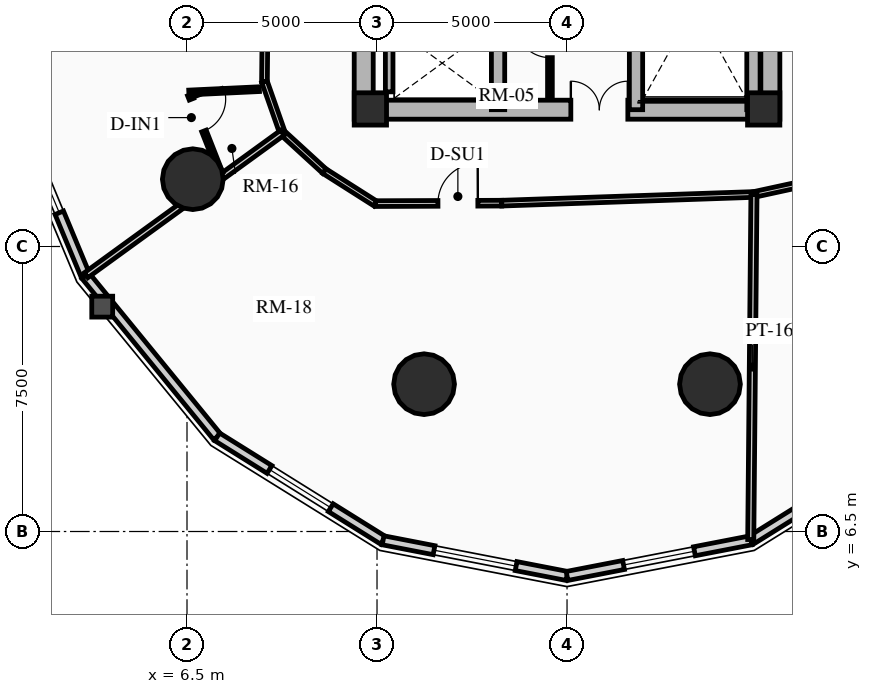
"""IFC4 building model, lengths in metres.
Left out: names, types, materials, properties, quantities, classifications, styles, units other than length and angle.
Written with IfcOpenShell. Run it as: python <this file> out.ifc"""

import sys

from ifc_helpers import new_model, si_unit, direction, frame, frame_2d, origin, origin_2d, place, context, subcontext, project, spatial, rectangle, circle, extrude, source, transform, mapped, element, fill, save


model = new_model("IFC4")
c1 = context("Model", 3, precision=1e-05, world=origin(), true_north=direction((0.0, 1.0)))
c2 = subcontext(c1, "Body", "Model", "MODEL_VIEW")
j1 = project(units=[si_unit("LENGTHUNIT", "METRE"), si_unit("PLANEANGLEUNIT", "RADIAN")], contexts=[c1])
p1 = place(None, origin())
s1 = spatial("IfcSite", under=j1, at=p1, CompositionType="ELEMENT")
p2 = place(p1, origin())
s2 = spatial("IfcBuilding", under=s1, at=p2, CompositionType="ELEMENT")
p3 = place(p2, frame((0.0, 0.0, 62.74)))
s3 = spatial("IfcBuildingStorey", under=s2, at=p3, CompositionType="ELEMENT", Elevation=62.74)
for number, where, z_axis, x_axis in (
    (1, (11.15, 17.35, 0.0), (0.0, 0.0, 1.0), (0.0, 1.0, 0.0)),
    (2, (21.85, 17.35, 0.0), (0.0, 0.0, 1.0), (0.0, 1.0, 0.0)),
):
    element("IfcWall", number, at=place(p3, frame(where, z_axis=z_axis, x_axis=x_axis)), inside=s3, PredefinedType="SHEAR", context=c2, shape_type="SweptSolid", body=[
        extrude(rectangle(XDim=14.3, YDim=0.5, at=frame_2d((7.15, 0.0))), origin(), (0.0, 0.0, 1.0), 2.91),
    ])
p4 = place(p3, frame((11.15, 17.6, 0.0), z_axis=(0.0, 0.0, 1.0), x_axis=(1.0, 0.0, 0.0)))
e3 = element("IfcWall", 3, at=p4, inside=s3, PredefinedType="SHEAR", context=c2, shape_type="SweptSolid", body=[
    extrude(rectangle(XDim=10.7, YDim=0.5, at=frame_2d((5.35, 0.0))), origin(), (0.0, 0.0, 1.0), 2.91),
])
m1 = source(origin(), c2, "Body", "SweptSolid", [
    extrude(rectangle(XDim=1.5, YDim=2.02, at=frame_2d((0.75, 1.01))), frame((0.0, 0.26, 0.0), z_axis=(0.0, -1.0, 0.0), x_axis=(1.0, 0.0, 0.0)), (0.0, 0.0, 1.0), 0.52),
])
p5 = place(p4, frame((5.45, 0.0, 0.0)))
e4 = element("IfcOpeningElement", 4, at=p5, cuts=e3, PredefinedType="OPENING", context=c2, shape_type="MappedRepresentation", body=[
    mapped(m1, transform((0.0, 0.0, 0.0), x_axis=(1.0, 0.0, 0.0), y_axis=(0.0, 1.0, 0.0), z_axis=(0.0, 0.0, 1.0), scale=1.0)),
])
p6 = place(p3, frame((14.685, 17.6, 0.0), z_axis=(0.0, 0.0, 1.0), x_axis=(0.0, 1.0, 0.0)))
e5 = element("IfcWall", 5, at=p6, inside=s3, PredefinedType="SHEAR", context=c2, shape_type="SweptSolid", body=[
    extrude(rectangle(XDim=13.8, YDim=0.35, at=frame_2d((6.9, 0.0))), origin(), (0.0, 0.0, 1.0), 2.91),
])
m2 = source(origin(), c2, "Body", "SweptSolid", [
    extrude(rectangle(XDim=1.1, YDim=2.015, at=frame_2d((0.55, 1.007))), frame((0.0, 0.185, 0.0), z_axis=(0.0, -1.0, 0.0), x_axis=(1.0, 0.0, 0.0)), (0.0, 0.0, 1.0), 0.37),
])
p7 = place(p6, frame((4.9, 0.0, 0.0)))
e6 = element("IfcOpeningElement", 6, at=p7, cuts=e5, PredefinedType="OPENING", context=c2, shape_type="MappedRepresentation", body=[
    mapped(m2, transform((0.0, 0.0, 0.0), x_axis=(1.0, 0.0, 0.0), y_axis=(0.0, 1.0, 0.0), z_axis=(0.0, 0.0, 1.0), scale=1.0)),
])
m3 = source(origin(), c2, "Body", "SweptSolid", [
    extrude(rectangle(XDim=1.15, YDim=2.02, at=frame_2d((0.575, 1.01))), frame((0.0, 0.185, 0.0), z_axis=(0.0, -1.0, 0.0), x_axis=(1.0, 0.0, 0.0)), (0.0, 0.0, 1.0), 0.37),
])
p8 = place(p6, frame((7.32, 0.0, 0.0)))
e7 = element("IfcOpeningElement", 7, at=p8, cuts=e5, PredefinedType="OPENING", context=c2, shape_type="MappedRepresentation", body=[
    mapped(m3, transform((0.0, 0.0, 0.0), x_axis=(1.0, 0.0, 0.0), y_axis=(0.0, 1.0, 0.0), z_axis=(0.0, 0.0, 1.0), scale=1.0)),
])
p9 = place(p3, frame((18.315, 17.6, 0.0), z_axis=(0.0, 0.0, 1.0), x_axis=(0.0, 1.0, 0.0)))
e8 = element("IfcWall", 8, at=p9, inside=s3, PredefinedType="SHEAR", context=c2, shape_type="SweptSolid", body=[
    extrude(rectangle(XDim=13.8, YDim=0.35, at=frame_2d((6.9, 0.0))), origin(), (0.0, 0.0, 1.0), 2.91),
])
p10 = place(p9, frame((10.025, 0.0, 0.0)))
e9 = element("IfcOpeningElement", 9, at=p10, cuts=e8, PredefinedType="OPENING", context=c2, shape_type="MappedRepresentation", body=[
    mapped(m2, transform((0.0, 0.0, 0.0), x_axis=(1.0, 0.0, 0.0), y_axis=(0.0, 1.0, 0.0), z_axis=(0.0, 0.0, 1.0), scale=1.0)),
])
p11 = place(p9, frame((12.025, 0.0, 0.0)))
e10 = element("IfcOpeningElement", 10, at=p11, cuts=e8, PredefinedType="OPENING", context=c2, shape_type="MappedRepresentation", body=[
    mapped(m2, transform((0.0, 0.0, 0.0), x_axis=(1.0, 0.0, 0.0), y_axis=(0.0, 1.0, 0.0), z_axis=(0.0, 0.0, 1.0), scale=1.0)),
])
p12 = place(p9, frame((5.33, 0.0, 0.0)))
e11 = element("IfcOpeningElement", 11, at=p12, cuts=e8, PredefinedType="OPENING", context=c2, shape_type="MappedRepresentation", body=[
    mapped(m3, transform((0.0, 0.0, 0.0), x_axis=(1.0, 0.0, 0.0), y_axis=(0.0, 1.0, 0.0), z_axis=(0.0, 0.0, 1.0), scale=1.0)),
])
p13 = place(p3, frame((21.405, 17.6, 0.0), z_axis=(0.0, 0.0, 1.0), x_axis=(0.0, 1.0, 0.0)))
e12 = element("IfcWall", 12, at=p13, inside=s3, PredefinedType="SHEAR", context=c2, shape_type="SweptSolid", body=[
    extrude(rectangle(XDim=6.745, YDim=0.35, at=frame_2d((3.373, 0.0))), origin(), (0.0, 0.0, 1.0), 2.91),
])
for number, where, z_axis, x_axis in (
    (13, (11.325, 17.62, 0.0), (0.0, 0.0, 1.0), (1.0, 0.0, 0.0)),
    (14, (21.675, 17.62, 0.0), (0.0, 0.0, 1.0), (1.0, 0.0, 0.0)),
):
    element("IfcColumn", number, at=place(p3, frame(where, z_axis=z_axis, x_axis=x_axis)), inside=s3, PredefinedType="COLUMN", context=c2, shape_type="SweptSolid", body=[
        extrude(rectangle(XDim=0.85, YDim=0.85, at=origin_2d()), origin(), (0.0, 0.0, 1.0), 2.91),
    ])
for number, where, z_axis, x_axis in (
    (15, (6.653, 15.771, 0.0), (0.0, 0.0, 1.0), (1.0, 0.0, 0.0)),
    (16, (12.739, 10.377, 0.0), (0.0, 0.0, 1.0), (1.0, 0.0, 0.0)),
    (17, (20.261, 10.377, 0.0), (0.0, 0.0, 1.0), (1.0, 0.0, 0.0)),
):
    element("IfcColumn", number, at=place(p3, frame(where, z_axis=z_axis, x_axis=x_axis)), inside=s3, PredefinedType="USERDEFINED", context=c2, shape_type="SweptSolid", body=[
        extrude(circle(Radius=0.8, at=origin_2d()), origin(), (0.0, 0.0, 1.0), 2.91),
    ])
p14 = place(p3, frame((3.828, 13.232, 0.0), z_axis=(0.0, 0.0, 1.0), x_axis=(-0.384348836956, 0.923187939442, 0.0)))
e18 = element("IfcWall", 18, at=p14, inside=s3, PredefinedType="SOLIDWALL", context=c2, shape_type="SweptSolid", body=[
    extrude(rectangle(XDim=5.789, YDim=0.24, at=frame_2d((2.894, 0.0))), origin(), (0.0, 0.0, 1.0), 2.079),
])
m4 = source(origin(), c2, "Body", "SweptSolid", [
    extrude(rectangle(XDim=2.2, YDim=1.35, at=frame_2d((1.1, 0.675))), frame((0.0, 0.13, 0.0), z_axis=(0.0, -1.0, 0.0), x_axis=(1.0, 0.0, 0.0)), (0.0, 0.0, 1.0), 0.26),
])
p15 = place(p14, frame((1.794, 0.0, 0.65)))
e19 = element("IfcOpeningElement", 19, at=p15, cuts=e18, PredefinedType="OPENING", context=c2, shape_type="MappedRepresentation", body=[
    mapped(m4, transform((0.0, 0.0, 0.0), x_axis=(1.0, 0.0, 0.0), y_axis=(0.0, 1.0, 0.0), z_axis=(0.0, 0.0, 1.0), scale=1.0)),
])
p16 = place(p3, frame((7.293, 8.991, 0.0), z_axis=(0.0, 0.0, 1.0), x_axis=(-0.632713287022, 0.77438614168, 0.0)))
e20 = element("IfcWall", 20, at=p16, inside=s3, PredefinedType="SOLIDWALL", context=c2, shape_type="SweptSolid", body=[
    extrude(rectangle(XDim=5.477, YDim=0.24, at=frame_2d((2.738, 0.0))), origin(), (0.0, 0.0, 1.0), 2.079),
])
p17 = place(p3, frame((11.66, 6.268, 0.0), z_axis=(0.0, 0.0, 1.0), x_axis=(-0.848533613342, 0.529141481107, 0.0)))
e21 = element("IfcWall", 21, at=p17, inside=s3, PredefinedType="SOLIDWALL", context=c2, shape_type="SweptSolid", body=[
    extrude(rectangle(XDim=5.146, YDim=0.24, at=frame_2d((2.573, 0.0))), origin(), (0.0, 0.0, 1.0), 2.079),
])
m5 = source(origin(), c2, "Body", "SweptSolid", [
    extrude(rectangle(XDim=1.9, YDim=1.35, at=frame_2d((0.95, 0.675))), frame((0.0, 0.13, 0.0), z_axis=(0.0, -1.0, 0.0), x_axis=(1.0, 0.0, 0.0)), (0.0, 0.0, 1.0), 0.26),
])
p18 = place(p17, frame((1.623, 0.0, 0.65)))
e22 = element("IfcOpeningElement", 22, at=p18, cuts=e21, PredefinedType="OPENING", context=c2, shape_type="MappedRepresentation", body=[
    mapped(m5, transform((0.0, 0.0, 0.0), x_axis=(1.0, 0.0, 0.0), y_axis=(0.0, 1.0, 0.0), z_axis=(0.0, 0.0, 1.0), scale=1.0)),
])
p19 = place(p3, frame((16.5, 5.33, 0.0), z_axis=(0.0, 0.0, 1.0), x_axis=(-0.981725274071, 0.190303668512, 0.0)))
e23 = element("IfcWall", 23, at=p19, inside=s3, PredefinedType="SOLIDWALL", context=c2, shape_type="SweptSolid", body=[
    extrude(rectangle(XDim=4.93, YDim=0.24, at=frame_2d((2.465, 0.0))), origin(), (0.0, 0.0, 1.0), 2.079),
])
p20 = place(p19, frame((1.365, 0.0, 0.65)))
e24 = element("IfcOpeningElement", 24, at=p20, cuts=e23, PredefinedType="OPENING", context=c2, shape_type="MappedRepresentation", body=[
    mapped(m4, transform((0.0, 0.0, 0.0), x_axis=(1.0, 0.0, 0.0), y_axis=(0.0, 1.0, 0.0), z_axis=(0.0, 0.0, 1.0), scale=1.0)),
])
p21 = place(p3, frame((21.34, 6.268, 0.0), z_axis=(0.0, 0.0, 1.0), x_axis=(-0.981725274071, -0.190303668512, 0.0)))
e25 = element("IfcWall", 25, at=p21, inside=s3, PredefinedType="SOLIDWALL", context=c2, shape_type="SweptSolid", body=[
    extrude(rectangle(XDim=4.93, YDim=0.24, at=frame_2d((2.465, 0.0))), origin(), (0.0, 0.0, 1.0), 2.079),
])
p22 = place(p21, frame((1.515, 0.0, 0.65)))
e26 = element("IfcOpeningElement", 26, at=p22, cuts=e25, PredefinedType="OPENING", context=c2, shape_type="MappedRepresentation", body=[
    mapped(m5, transform((0.0, 0.0, 0.0), x_axis=(1.0, 0.0, 0.0), y_axis=(0.0, 1.0, 0.0), z_axis=(0.0, 0.0, 1.0), scale=1.0)),
])
p23 = place(p3, frame((25.707, 8.991, 0.0), z_axis=(0.0, 0.0, 1.0), x_axis=(-0.848533613342, -0.529141481107, 0.0)))
e27 = element("IfcWall", 27, at=p23, inside=s3, PredefinedType="SOLIDWALL", context=c2, shape_type="SweptSolid", body=[
    extrude(rectangle(XDim=5.146, YDim=0.24, at=frame_2d((2.573, 0.0))), origin(), (0.0, 0.0, 1.0), 2.079),
])
p24 = place(p3, frame((11.82, 18.07, 0.0), z_axis=(0.0, 0.0, 1.0), x_axis=(0.0, 1.0, 0.0)))
e28 = element("IfcWall", 28, at=p24, inside=s3, PredefinedType="SHEAR", context=c2, shape_type="SweptSolid", body=[
    extrude(rectangle(XDim=1.635, YDim=0.2, at=frame_2d((0.817, 0.0))), origin(), (0.0, 0.0, 1.0), 2.91),
])
p25 = place(p3, frame((16.05, 17.92, 0.0), z_axis=(0.0, 0.0, 1.0), x_axis=(0.0, 1.0, 0.0)))
e29 = element("IfcWall", 29, at=p25, inside=s3, PredefinedType="PARTITIONING", context=c2, shape_type="SweptSolid", body=[
    extrude(rectangle(XDim=3.08, YDim=0.125, at=frame_2d((1.54, 0.0))), origin(), (0.0, 0.0, 1.0), 2.555),
])
m6 = source(origin(), c2, "Body", "SweptSolid", [
    extrude(rectangle(XDim=0.9, YDim=2.005, at=frame_2d((0.45, 1.002))), frame((0.0, 0.073, 0.0), z_axis=(0.0, -1.0, 0.0), x_axis=(1.0, 0.0, 0.0)), (0.0, 0.0, 1.0), 0.145),
])
p26 = place(p25, frame((1.05, 0.0, 0.0)))
e30 = element("IfcOpeningElement", 30, at=p26, cuts=e29, PredefinedType="OPENING", context=c2, shape_type="MappedRepresentation", body=[
    mapped(m6, transform((0.0, 0.0, 0.0), x_axis=(1.0, 0.0, 0.0), y_axis=(0.0, 1.0, 0.0), z_axis=(0.0, 0.0, 1.0), scale=1.0)),
])
p27 = place(p3, frame((8.6, 24.5, 0.0), z_axis=(0.0, 0.0, 1.0), x_axis=(-0.010023665349, -0.999949761805, 0.0)))
e31 = element("IfcWall", 31, at=p27, inside=s3, PredefinedType="PARTITIONING", context=c2, shape_type="SweptSolid", body=[
    extrude(rectangle(XDim=6.162, YDim=0.15, at=frame_2d((3.081, 0.0))), origin(), (0.0, 0.0, 1.0), 2.079),
])
m7 = source(origin(), c2, "Body", "SweptSolid", [
    extrude(rectangle(XDim=1.05, YDim=2.015, at=frame_2d((0.525, 1.007))), frame((0.0, 0.085, 0.0), z_axis=(0.0, -1.0, 0.0), x_axis=(1.0, 0.0, 0.0)), (0.0, 0.0, 1.0), 0.17),
])
p28 = place(p27, frame((2.556, 0.0, 0.0)))
e32 = element("IfcOpeningElement", 32, at=p28, cuts=e31, PredefinedType="OPENING", context=c2, shape_type="MappedRepresentation", body=[
    mapped(m7, transform((0.0, 0.0, 0.0), x_axis=(1.0, 0.0, 0.0), y_axis=(0.0, 1.0, 0.0), z_axis=(0.0, 0.0, 1.0), scale=1.0)),
])
p29 = place(p3, frame((8.538, 18.338, 0.0), z_axis=(0.0, 0.0, 1.0), x_axis=(0.331358150167, -0.94350504838, 0.0)))
e33 = element("IfcWall", 33, at=p29, inside=s3, PredefinedType="PARTITIONING", context=c2, shape_type="SweptSolid", body=[
    extrude(rectangle(XDim=1.424, YDim=0.15, at=frame_2d((0.712, 0.0))), origin(), (0.0, 0.0, 1.0), 2.125),
])
p30 = place(p3, frame((9.01, 16.994, 0.0), z_axis=(0.0, 0.0, 1.0), x_axis=(0.737701798986, -0.67512669609, 0.0)))
e34 = element("IfcWall", 34, at=p30, inside=s3, PredefinedType="PARTITIONING", context=c2, shape_type="SweptSolid", body=[
    extrude(rectangle(XDim=1.498, YDim=0.15, at=frame_2d((0.749, 0.0))), origin(), (0.0, 0.0, 1.0), 2.079),
])
p31 = place(p3, frame((10.115, 15.983, 0.0), z_axis=(0.0, 0.0, 1.0), x_axis=(0.843995849351, -0.536349705209, 0.0)))
e35 = element("IfcWall", 35, at=p31, inside=s3, PredefinedType="PARTITIONING", context=c2, shape_type="SweptSolid", body=[
    extrude(rectangle(XDim=1.593, YDim=0.15, at=frame_2d((0.796, 0.0))), origin(), (0.0, 0.0, 1.0), 2.125),
])
p32 = place(p3, frame((11.46, 15.129, 0.0), z_axis=(0.0, 0.0, 1.0), x_axis=(0.999993513287, 0.003601858435, 0.0)))
e36 = element("IfcWall", 36, at=p32, inside=s3, PredefinedType="PARTITIONING", context=c2, shape_type="SweptSolid", body=[
    extrude(rectangle(XDim=3.321, YDim=0.15, at=frame_2d((1.661, 0.0))), origin(), (0.0, 0.0, 1.0), 2.079),
])
p33 = place(p32, frame((1.643, 0.0, 0.0)))
e37 = element("IfcOpeningElement", 37, at=p33, cuts=e36, PredefinedType="OPENING", context=c2, shape_type="MappedRepresentation", body=[
    mapped(m7, transform((0.0, 0.0, 0.0), x_axis=(1.0, 0.0, 0.0), y_axis=(0.0, 1.0, 0.0), z_axis=(0.0, 0.0, 1.0), scale=1.0)),
])
p34 = place(p3, frame((14.781, 15.141, 0.0), z_axis=(0.0, 0.0, 1.0), x_axis=(0.999407918707, 0.034406569513, 0.0)))
e38 = element("IfcWall", 38, at=p34, inside=s3, PredefinedType="PARTITIONING", context=c2, shape_type="SweptSolid", body=[
    extrude(rectangle(XDim=6.642, YDim=0.15, at=frame_2d((3.321, 0.0))), origin(), (0.0, 0.0, 1.0), 2.079),
])
p35 = place(p3, frame((21.419, 15.369, 0.0), z_axis=(0.0, 0.0, 1.0), x_axis=(0.977192701953, 0.212354475464, 0.0)))
e39 = element("IfcWall", 39, at=p35, inside=s3, PredefinedType="PARTITIONING", context=c2, shape_type="SweptSolid", body=[
    extrude(rectangle(XDim=1.888, YDim=0.15, at=frame_2d((0.944, 0.0))), origin(), (0.0, 0.0, 1.0), 2.125),
])
p36 = place(p3, frame((9.01, 16.994, 0.0), z_axis=(0.0, 0.0, 1.0), x_axis=(-0.809215422166, -0.58751204288, 0.0)))
e40 = element("IfcWall", 40, at=p36, inside=s3, PredefinedType="PARTITIONING", context=c2, shape_type="SweptSolid", body=[
    extrude(rectangle(XDim=6.384, YDim=0.16, at=frame_2d((3.192, 0.0))), origin(), (0.0, 0.0, 1.0), 2.079),
])
p37 = place(p3, frame((21.419, 15.369, 0.0), z_axis=(0.0, 0.0, 1.0), x_axis=(-0.009327801925, -0.999956495109, 0.0)))
e41 = element("IfcWall", 41, at=p37, inside=s3, PredefinedType="PARTITIONING", context=c2, shape_type="SweptSolid", body=[
    extrude(rectangle(XDim=9.082, YDim=0.16, at=frame_2d((4.541, 0.0))), origin(), (0.0, 0.0, 1.0), 2.079),
])
p38 = place(p3, frame((8.404, 18.14, 0.0), z_axis=(0.0, 0.0, 1.0), x_axis=(-0.998892680948, -0.047046912219, 0.0)))
e42 = element("IfcWall", 42, at=p38, inside=s3, PredefinedType="PARTITIONING", context=c2, shape_type="SweptSolid", body=[
    extrude(rectangle(XDim=1.858, YDim=0.125, at=frame_2d((0.929, 0.0))), origin(), (0.0, 0.0, 1.0), 2.125),
])
p39 = place(p3, frame((6.574, 17.989, 0.0), z_axis=(0.0, 0.0, 1.0), x_axis=(0.365563636102, -0.930786349255, 0.0)))
e43 = element("IfcWall", 43, at=p39, inside=s3, PredefinedType="PARTITIONING", context=c2, shape_type="SweptSolid", body=[
    extrude(rectangle(XDim=2.213, YDim=0.125, at=frame_2d((1.106, 0.0))), origin(), (0.0, 0.0, 1.0), 2.079),
])
p40 = place(p39, frame((0.12, 0.0, 0.0)))
e44 = element("IfcOpeningElement", 44, at=p40, cuts=e43, PredefinedType="OPENING", context=c2, shape_type="MappedRepresentation", body=[
    mapped(m6, transform((0.0, 0.0, 0.0), x_axis=(1.0, 0.0, 0.0), y_axis=(0.0, 1.0, 0.0), z_axis=(0.0, 0.0, 1.0), scale=1.0)),
])
m8 = source(origin(), c2, "Body", "SweptSolid", [
    extrude(rectangle(XDim=2.2, YDim=1.35, at=frame_2d((1.1, 0.675))), frame((0.0, 0.03, 0.0), z_axis=(0.0, -1.0, 0.0), x_axis=(1.0, 0.0, 0.0)), (0.0, 0.0, 1.0), 0.06),
])
p41 = place(p15, origin())
e45 = element("IfcWindow", 45, at=p41, inside=s3, PartitioningType="DOUBLE_PANEL_VERTICAL", PredefinedType="WINDOW", context=c2, shape_type="MappedRepresentation", body=[
    mapped(m8, transform((0.0, 0.0, 0.0), x_axis=(1.0, 0.0, 0.0), y_axis=(0.0, 1.0, 0.0), z_axis=(0.0, 0.0, 1.0), scale=1.0)),
])
fill(e19, e45)
m9 = source(origin(), c2, "Body", "SweptSolid", [
    extrude(rectangle(XDim=1.9, YDim=1.35, at=frame_2d((0.95, 0.675))), frame((0.0, 0.03, 0.0), z_axis=(0.0, -1.0, 0.0), x_axis=(1.0, 0.0, 0.0)), (0.0, 0.0, 1.0), 0.06),
])
p42 = place(p18, origin())
e46 = element("IfcWindow", 46, at=p42, inside=s3, PartitioningType="DOUBLE_PANEL_VERTICAL", PredefinedType="WINDOW", context=c2, shape_type="MappedRepresentation", body=[
    mapped(m9, transform((0.0, 0.0, 0.0), x_axis=(1.0, 0.0, 0.0), y_axis=(0.0, 1.0, 0.0), z_axis=(0.0, 0.0, 1.0), scale=1.0)),
])
fill(e22, e46)
p43 = place(p20, origin())
e47 = element("IfcWindow", 47, at=p43, inside=s3, PartitioningType="DOUBLE_PANEL_VERTICAL", PredefinedType="WINDOW", context=c2, shape_type="MappedRepresentation", body=[
    mapped(m8, transform((0.0, 0.0, 0.0), x_axis=(1.0, 0.0, 0.0), y_axis=(0.0, 1.0, 0.0), z_axis=(0.0, 0.0, 1.0), scale=1.0)),
])
fill(e24, e47)
p44 = place(p22, origin())
e48 = element("IfcWindow", 48, at=p44, inside=s3, PartitioningType="DOUBLE_PANEL_VERTICAL", PredefinedType="WINDOW", context=c2, shape_type="MappedRepresentation", body=[
    mapped(m9, transform((0.0, 0.0, 0.0), x_axis=(1.0, 0.0, 0.0), y_axis=(0.0, 1.0, 0.0), z_axis=(0.0, 0.0, 1.0), scale=1.0)),
])
fill(e26, e48)
m10 = source(origin(), c2, "Body", "SweptSolid", [
    extrude(rectangle(XDim=1.5, YDim=2.02, at=frame_2d((0.75, 1.01))), frame((0.0, 0.025, 0.0), z_axis=(0.0, -1.0, 0.0), x_axis=(1.0, 0.0, 0.0)), (0.0, 0.0, 1.0), 0.05),
])
p45 = place(p5, origin())
e49 = element("IfcDoor", 49, at=p45, inside=s3, OperationType="DOUBLE_DOOR_SINGLE_SWING", PredefinedType="DOOR", context=c2, shape_type="MappedRepresentation", body=[
    mapped(m10, transform((0.0, 0.0, 0.0), x_axis=(1.0, 0.0, 0.0), y_axis=(0.0, 1.0, 0.0), z_axis=(0.0, 0.0, 1.0), scale=1.0)),
])
fill(e4, e49)
m11 = source(origin(), c2, "Body", "SweptSolid", [
    extrude(rectangle(XDim=0.9, YDim=2.005, at=frame_2d((0.45, 1.002))), frame((0.0, 0.025, 0.0), z_axis=(0.0, -1.0, 0.0), x_axis=(1.0, 0.0, 0.0)), (0.0, 0.0, 1.0), 0.05),
])
p46 = place(p26, origin())
e50 = element("IfcDoor", 50, at=p46, inside=s3, OperationType="SINGLE_SWING_RIGHT", PredefinedType="DOOR", context=c2, shape_type="MappedRepresentation", body=[
    mapped(m11, transform((0.0, 0.0, 0.0), x_axis=(1.0, 0.0, 0.0), y_axis=(0.0, 1.0, 0.0), z_axis=(0.0, 0.0, 1.0), scale=1.0)),
])
fill(e30, e50)
p47 = place(p40, origin())
e51 = element("IfcDoor", 51, at=p47, inside=s3, OperationType="SINGLE_SWING_LEFT", PredefinedType="DOOR", context=c2, shape_type="MappedRepresentation", body=[
    mapped(m11, transform((0.0, 0.0, 0.0), x_axis=(1.0, 0.0, 0.0), y_axis=(0.0, 1.0, 0.0), z_axis=(0.0, 0.0, 1.0), scale=1.0)),
])
fill(e44, e51)
m12 = source(origin(), c2, "Body", "SweptSolid", [
    extrude(rectangle(XDim=1.05, YDim=2.015, at=frame_2d((0.525, 1.007))), frame((0.0, 0.025, 0.0), z_axis=(0.0, -1.0, 0.0), x_axis=(1.0, 0.0, 0.0)), (0.0, 0.0, 1.0), 0.05),
])
p48 = place(p33, origin())
e52 = element("IfcDoor", 52, at=p48, inside=s3, OperationType="SINGLE_SWING_RIGHT", PredefinedType="DOOR", context=c2, shape_type="MappedRepresentation", body=[
    mapped(m12, transform((0.0, 0.0, 0.0), x_axis=(1.0, 0.0, 0.0), y_axis=(0.0, 1.0, 0.0), z_axis=(0.0, 0.0, 1.0), scale=1.0)),
])
fill(e37, e52)
save(model, sys.argv[1])
